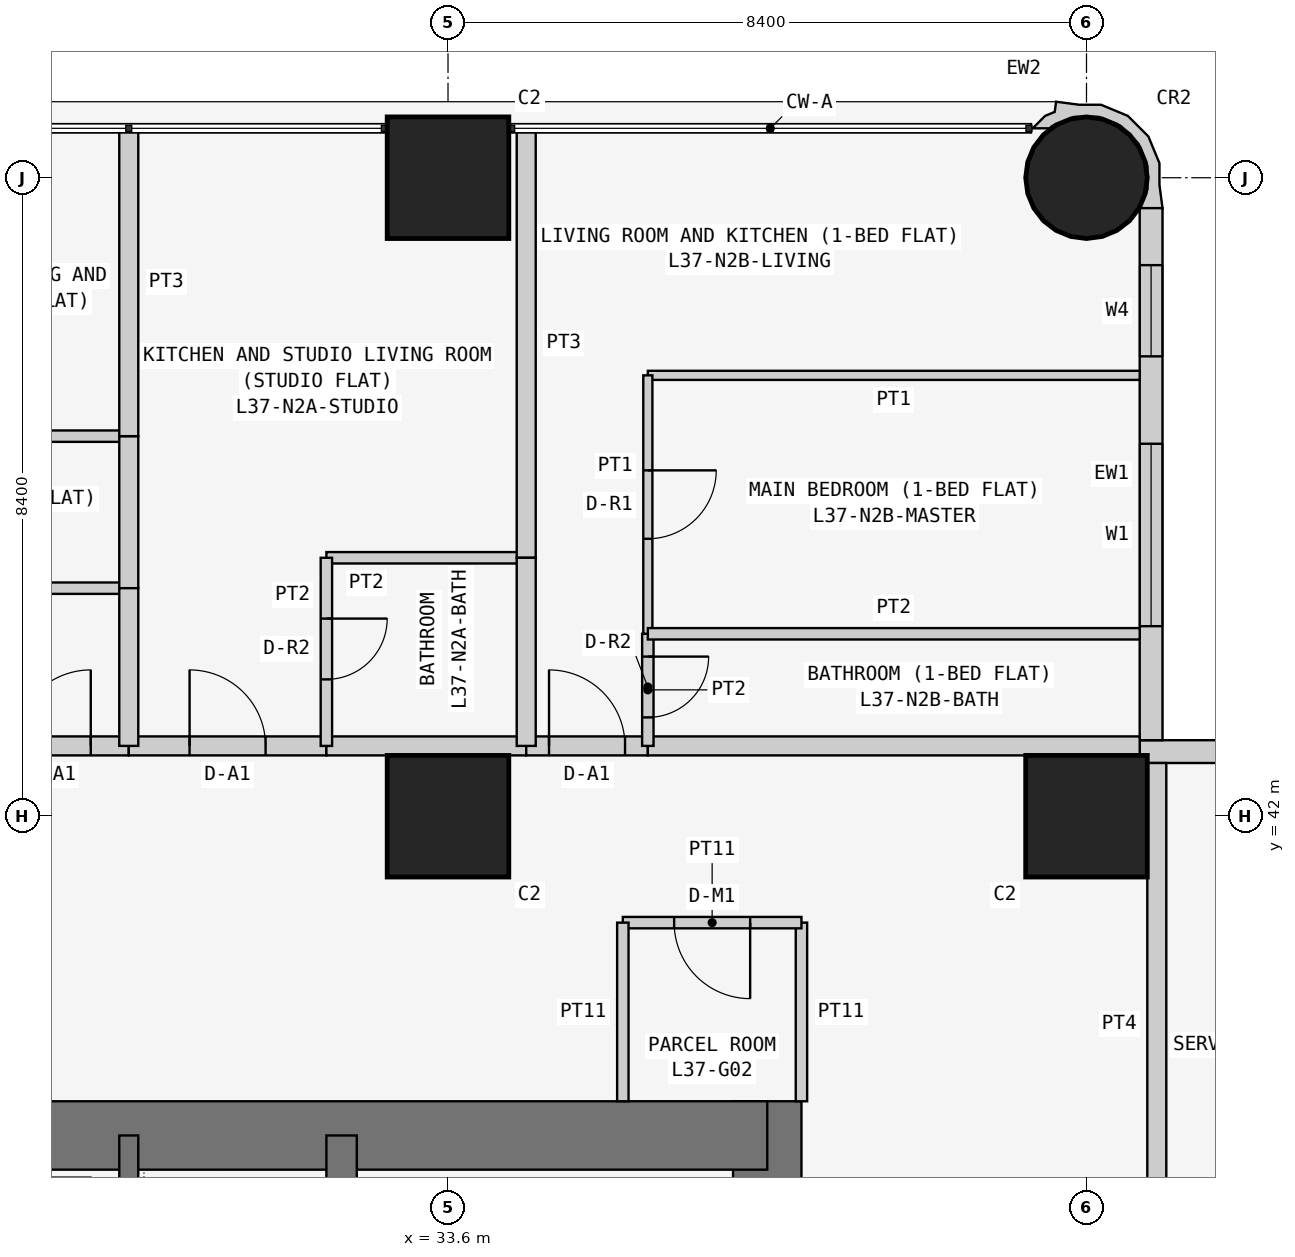
"""IFC4 building model, lengths in metres.
Left out: names, types, materials, properties, quantities, classifications, styles, units other than length and angle.
Written with IfcOpenShell. Run it as: python <this file> out.ifc"""

import sys

from ifc_helpers import new_model, si_unit, direction, frame, frame_2d, origin, origin_2d, place, context, subcontext, project, spatial, polyline, rectangle, circle, outline, extrude, element, fill, save


model = new_model("IFC4")
c1 = context("Model", 3, precision=1e-05, world=origin(), true_north=direction((0.0, 1.0)))
c2 = subcontext(c1, "Body", "Model", "MODEL_VIEW")
j1 = project(units=[si_unit("LENGTHUNIT", "METRE"), si_unit("PLANEANGLEUNIT", "RADIAN")], contexts=[c1])
p1 = place(None, origin())
s1 = spatial("IfcSite", under=j1, at=p1, CompositionType="ELEMENT")
p2 = place(p1, origin())
s2 = spatial("IfcBuilding", under=s1, at=p2, CompositionType="ELEMENT")
p3 = place(p2, frame((0.0, 0.0, 144.9)))
s3 = spatial("IfcBuildingStorey", under=s2, at=p3, CompositionType="ELEMENT", Elevation=144.9)
for number, where, z_axis, x_axis in (
    (1, (33.6, 42.0, 0.0), (0.0, 0.0, 1.0), (1.0, 0.0, 0.0)),
    (2, (33.6, 50.4, 0.0), (0.0, 0.0, 1.0), (1.0, 0.0, 0.0)),
    (3, (42.0, 42.0, 0.0), (0.0, 0.0, 1.0), (1.0, 0.0, 0.0)),
):
    element("IfcColumn", number, at=place(p3, frame(where, z_axis=z_axis, x_axis=x_axis)), inside=s3, PredefinedType="COLUMN", context=c2, shape_type="SweptSolid", body=[
        extrude(rectangle(XDim=1.6, YDim=1.6, at=origin_2d()), origin(), (0.0, 0.0, 1.0), 3.6),
    ])
p4 = place(p3, frame((42.0, 50.4, 0.0), z_axis=(0.0, 0.0, 1.0), x_axis=(1.0, 0.0, 0.0)))
e4 = element("IfcColumn", 4, at=p4, inside=s3, PredefinedType="COLUMN", context=c2, shape_type="SweptSolid", body=[
    extrude(circle(Radius=0.8, at=origin_2d()), origin(), (0.0, 0.0, 1.0), 3.6),
])
p5 = place(p3, frame((37.8, 21.0, 0.0), z_axis=(0.0, 0.0, 1.0), x_axis=(0.0, 1.0, 0.0)))
e5 = element("IfcWall", 5, at=p5, inside=s3, PredefinedType="SHEAR", context=c2, shape_type="SweptSolid", body=[
    extrude(rectangle(XDim=17.25, YDim=0.9, at=frame_2d((8.625, 0.0))), origin(), (0.0, 0.0, 1.0), 3.6),
])
p6 = place(p5, frame((5.2, 0.0, 0.0)))
e6 = element("IfcOpeningElement", 6, at=p6, cuts=e5, PredefinedType="OPENING", context=c2, shape_type="SweptSolid", body=[
    extrude(rectangle(XDim=1.2, YDim=2.1, at=frame_2d((0.6, 1.05))), frame((0.0, 0.46, 0.0), z_axis=(0.0, -1.0, 0.0), x_axis=(1.0, 0.0, 0.0)), (0.0, 0.0, 1.0), 0.92),
])
p7 = place(p3, frame((37.8, 37.8, 0.0), z_axis=(0.0, 0.0, 1.0), x_axis=(-1.0, 0.0, 0.0)))
e7 = element("IfcWall", 7, at=p7, inside=s3, PredefinedType="SHEAR", context=c2, shape_type="SweptSolid", body=[
    extrude(rectangle(XDim=17.25, YDim=0.9, at=frame_2d((8.625, 0.0))), origin(), (0.0, 0.0, 1.0), 3.6),
])
p8 = place(p3, frame((32.2, 29.2, 0.0), z_axis=(0.0, 0.0, 1.0), x_axis=(0.0, 1.0, 0.0)))
e8 = element("IfcWall", 8, at=p8, inside=s3, PredefinedType="SHEAR", context=c2, shape_type="SweptSolid", body=[
    extrude(rectangle(XDim=8.6, YDim=0.4, at=frame_2d((4.3, 0.0))), origin(), (0.0, 0.0, 1.0), 3.6),
])
p9 = place(p3, frame((29.4, 34.6, 0.0), z_axis=(0.0, 0.0, 1.0), x_axis=(0.0, 1.0, 0.0)))
e9 = element("IfcWall", 9, at=p9, inside=s3, PredefinedType="SHEAR", context=c2, shape_type="SweptSolid", body=[
    extrude(rectangle(XDim=3.2, YDim=0.25, at=frame_2d((1.6, 0.0))), origin(), (0.0, 0.0, 1.0), 3.6),
])
p10 = place(p3, frame((58.4, 42.85, 0.0), z_axis=(0.0, 0.0, 1.0), x_axis=(-1.0, 0.0, 0.0)))
e10 = element("IfcWall", 10, at=p10, inside=s3, PredefinedType="SOLIDWALL", context=c2, shape_type="SweptSolid", body=[
    extrude(rectangle(XDim=15.7, YDim=0.3, at=frame_2d((7.85, 0.0))), origin(), (0.0, 0.0, 1.0), 3.45),
])
p11 = place(p10, frame((12.4, 0.0, 0.9)))
e11 = element("IfcOpeningElement", 11, at=p11, cuts=e10, PredefinedType="OPENING", context=c2, shape_type="SweptSolid", body=[
    extrude(rectangle(XDim=1.8, YDim=1.5, at=frame_2d((0.9, 0.75))), frame((0.0, 0.16, 0.0), z_axis=(0.0, -1.0, 0.0), x_axis=(1.0, 0.0, 0.0)), (0.0, 0.0, 1.0), 0.32),
])
p12 = place(p10, frame((9.55, 0.0, 1.5)))
e12 = element("IfcOpeningElement", 12, at=p12, cuts=e10, PredefinedType="OPENING", context=c2, shape_type="SweptSolid", body=[
    extrude(rectangle(XDim=0.9, YDim=0.7, at=frame_2d((0.45, 0.35))), frame((0.0, 0.16, 0.0), z_axis=(0.0, -1.0, 0.0), x_axis=(1.0, 0.0, 0.0)), (0.0, 0.0, 1.0), 0.32),
])
p13 = place(p10, frame((5.1, 0.0, 0.9)))
e13 = element("IfcOpeningElement", 13, at=p13, cuts=e10, PredefinedType="OPENING", context=c2, shape_type="SweptSolid", body=[
    extrude(rectangle(XDim=1.8, YDim=1.5, at=frame_2d((0.9, 0.75))), frame((0.0, 0.16, 0.0), z_axis=(0.0, -1.0, 0.0), x_axis=(1.0, 0.0, 0.0)), (0.0, 0.0, 1.0), 0.32),
])
p14 = place(p10, frame((2.0, 0.0, 0.0)))
e14 = element("IfcOpeningElement", 14, at=p14, cuts=e10, PredefinedType="OPENING", context=c2, shape_type="SweptSolid", body=[
    extrude(rectangle(XDim=0.9, YDim=2.4, at=frame_2d((0.45, 1.2))), frame((0.0, 0.16, 0.0), z_axis=(0.0, -1.0, 0.0), x_axis=(1.0, 0.0, 0.0)), (0.0, 0.0, 1.0), 0.32),
])
p15 = place(p10, frame((0.7, 0.0, 0.9)))
e15 = element("IfcOpeningElement", 15, at=p15, cuts=e10, PredefinedType="OPENING", context=c2, shape_type="SweptSolid", body=[
    extrude(rectangle(XDim=1.2, YDim=1.5, at=frame_2d((0.6, 0.75))), frame((0.0, 0.16, 0.0), z_axis=(0.0, -1.0, 0.0), x_axis=(1.0, 0.0, 0.0)), (0.0, 0.0, 1.0), 0.32),
])
p16 = place(p3, frame((42.85, 43.0, 0.0), z_axis=(0.0, 0.0, 1.0), x_axis=(0.0, 1.0, 0.0)))
e16 = element("IfcWall", 16, at=p16, inside=s3, PredefinedType="SOLIDWALL", context=c2, shape_type="SweptSolid", body=[
    extrude(rectangle(XDim=7.0, YDim=0.3, at=frame_2d((3.5, 0.0))), origin(), (0.0, 0.0, 1.0), 3.45),
])
p17 = place(p16, frame((1.5, 0.0, 0.9)))
e17 = element("IfcOpeningElement", 17, at=p17, cuts=e16, PredefinedType="OPENING", context=c2, shape_type="SweptSolid", body=[
    extrude(rectangle(XDim=2.4, YDim=1.5, at=frame_2d((1.2, 0.75))), frame((0.0, 0.16, 0.0), z_axis=(0.0, -1.0, 0.0), x_axis=(1.0, 0.0, 0.0)), (0.0, 0.0, 1.0), 0.32),
])
p18 = place(p16, frame((5.05, 0.0, 0.9)))
e18 = element("IfcOpeningElement", 18, at=p18, cuts=e16, PredefinedType="OPENING", context=c2, shape_type="SweptSolid", body=[
    extrude(rectangle(XDim=1.2, YDim=1.5, at=frame_2d((0.6, 0.75))), frame((0.0, 0.16, 0.0), z_axis=(0.0, -1.0, 0.0), x_axis=(1.0, 0.0, 0.0)), (0.0, 0.0, 1.0), 0.32),
])
p19 = place(p3, frame((42.817, 50.073, 0.0), z_axis=(0.0, 0.0, 1.0), x_axis=(0.343276641956, 0.93923434088, 0.0)))
e19 = element("IfcWall", 19, at=p19, inside=s3, PredefinedType="SOLIDWALL", context=c2, shape_type="SweptSolid", body=[
    extrude(outline(polyline([(0.266, -0.055), (0.535, 0.044), (0.817, 0.302), (0.978, 0.648), (0.994, 1.03), (0.895, 1.3), (0.828, 1.598), (0.697, 1.569), (0.604, 1.67), (0.394, 1.767), (0.471, 1.556), (0.509, 1.539), (0.724, 1.304), (0.833, 1.005), (0.82, 0.687), (0.686, 0.397), (0.451, 0.182), (0.152, 0.073), (-0.116, 0.084), (-0.128, 0.078), (-0.146, 0.071), (-0.006, -0.197), (0.266, -0.055)])), origin(), (0.0, 0.0, 1.0), 3.45),
])
p20 = place(p3, frame((38.25, 38.25, 0.0), z_axis=(0.0, 0.0, 1.0), x_axis=(0.0, 1.0, 0.0)))
e20 = element("IfcWall", 20, at=p20, inside=s3, PredefinedType="PARTITIONING", context=c2, shape_type="SweptSolid", body=[
    extrude(rectangle(XDim=2.35, YDim=0.15, at=frame_2d((1.175, 0.0))), origin(), (0.0, 0.0, 1.0), 3.45),
])
p21 = place(p3, frame((38.25, 40.6, 0.0), z_axis=(0.0, 0.0, 1.0), x_axis=(-1.0, 0.0, 0.0)))
e21 = element("IfcWall", 21, at=p21, inside=s3, PredefinedType="PARTITIONING", context=c2, shape_type="SweptSolid", body=[
    extrude(rectangle(XDim=2.35, YDim=0.15, at=frame_2d((1.175, 0.0))), origin(), (0.0, 0.0, 1.0), 3.45),
])
p22 = place(p21, frame((0.675, 0.0, 0.0)))
e22 = element("IfcOpeningElement", 22, at=p22, cuts=e21, PredefinedType="OPENING", context=c2, shape_type="SweptSolid", body=[
    extrude(rectangle(XDim=1.0, YDim=2.1, at=frame_2d((0.5, 1.05))), frame((0.0, 0.085, 0.0), z_axis=(0.0, -1.0, 0.0), x_axis=(1.0, 0.0, 0.0)), (0.0, 0.0, 1.0), 0.17),
])
p23 = place(p3, frame((35.9, 40.6, 0.0), z_axis=(0.0, 0.0, 1.0), x_axis=(0.0, -1.0, 0.0)))
e23 = element("IfcWall", 23, at=p23, inside=s3, PredefinedType="PARTITIONING", context=c2, shape_type="SweptSolid", body=[
    extrude(rectangle(XDim=2.35, YDim=0.15, at=frame_2d((1.175, 0.0))), origin(), (0.0, 0.0, 1.0), 3.45),
])
p24 = place(p3, frame((22.971, 42.925, 0.0), z_axis=(0.0, 0.0, 1.0), x_axis=(1.0, 0.0, 0.0)))
e24 = element("IfcWall", 24, at=p24, inside=s3, PredefinedType="PARTITIONING", context=c2, shape_type="SweptSolid", body=[
    extrude(rectangle(XDim=6.429, YDim=0.25, at=frame_2d((3.214, 0.0))), origin(), (0.0, 0.0, 1.0), 3.45),
])
p25 = place(p24, frame((4.929, 0.0, 0.0)))
e25 = element("IfcOpeningElement", 25, at=p25, cuts=e24, PredefinedType="OPENING", context=c2, shape_type="SweptSolid", body=[
    extrude(rectangle(XDim=1.0, YDim=2.1, at=frame_2d((0.5, 1.05))), frame((0.0, 0.135, 0.0), z_axis=(0.0, -1.0, 0.0), x_axis=(1.0, 0.0, 0.0)), (0.0, 0.0, 1.0), 0.27),
])
p26 = place(p3, frame((29.4, 42.925, 0.0), z_axis=(0.0, 0.0, 1.0), x_axis=(1.0, 0.0, 0.0)))
e26 = element("IfcWall", 26, at=p26, inside=s3, PredefinedType="PARTITIONING", context=c2, shape_type="SweptSolid", body=[
    extrude(rectangle(XDim=2.6, YDim=0.25, at=frame_2d((1.3, 0.0))), origin(), (0.0, 0.0, 1.0), 3.45),
])
p27 = place(p26, frame((0.8, 0.0, 0.0)))
e27 = element("IfcOpeningElement", 27, at=p27, cuts=e26, PredefinedType="OPENING", context=c2, shape_type="SweptSolid", body=[
    extrude(rectangle(XDim=1.0, YDim=2.1, at=frame_2d((0.5, 1.05))), frame((0.0, 0.135, 0.0), z_axis=(0.0, -1.0, 0.0), x_axis=(1.0, 0.0, 0.0)), (0.0, 0.0, 1.0), 0.27),
])
p28 = place(p3, frame((32.0, 42.925, 0.0), z_axis=(0.0, 0.0, 1.0), x_axis=(1.0, 0.0, 0.0)))
e28 = element("IfcWall", 28, at=p28, inside=s3, PredefinedType="PARTITIONING", context=c2, shape_type="SweptSolid", body=[
    extrude(rectangle(XDim=2.629, YDim=0.25, at=frame_2d((1.314, 0.0))), origin(), (0.0, 0.0, 1.0), 3.45),
])
p29 = place(p3, frame((34.629, 42.925, 0.0), z_axis=(0.0, 0.0, 1.0), x_axis=(1.0, 0.0, 0.0)))
e29 = element("IfcWall", 29, at=p29, inside=s3, PredefinedType="PARTITIONING", context=c2, shape_type="SweptSolid", body=[
    extrude(rectangle(XDim=1.6, YDim=0.25, at=frame_2d((0.8, 0.0))), origin(), (0.0, 0.0, 1.0), 3.45),
])
p30 = place(p29, frame((0.3, 0.0, 0.0)))
e30 = element("IfcOpeningElement", 30, at=p30, cuts=e29, PredefinedType="OPENING", context=c2, shape_type="SweptSolid", body=[
    extrude(rectangle(XDim=1.0, YDim=2.1, at=frame_2d((0.5, 1.05))), frame((0.0, 0.135, 0.0), z_axis=(0.0, -1.0, 0.0), x_axis=(1.0, 0.0, 0.0)), (0.0, 0.0, 1.0), 0.27),
])
p31 = place(p3, frame((36.229, 42.925, 0.0), z_axis=(0.0, 0.0, 1.0), x_axis=(1.0, 0.0, 0.0)))
e31 = element("IfcWall", 31, at=p31, inside=s3, PredefinedType="PARTITIONING", context=c2, shape_type="SweptSolid", body=[
    extrude(rectangle(XDim=6.471, YDim=0.25, at=frame_2d((3.235, 0.0))), origin(), (0.0, 0.0, 1.0), 3.45),
])
p32 = place(p3, frame((42.925, 42.7, 0.0), z_axis=(0.0, 0.0, 1.0), x_axis=(0.0, -1.0, 0.0)))
e32 = element("IfcWall", 32, at=p32, inside=s3, PredefinedType="PARTITIONING", context=c2, shape_type="SweptSolid", body=[
    extrude(rectangle(XDim=6.871, YDim=0.25, at=frame_2d((3.436, 0.0))), origin(), (0.0, 0.0, 1.0), 3.45),
])
for number, where, z_axis, x_axis in (
    (33, (29.4, 47.0, 0.0), (0.0, 0.0, 1.0), (-1.0, 0.0, 0.0)),
    (34, (24.171, 45.0, 0.0), (0.0, 0.0, 1.0), (1.0, 0.0, 0.0)),
):
    element("IfcWall", number, at=place(p3, frame(where, z_axis=z_axis, x_axis=x_axis)), inside=s3, PredefinedType="PARTITIONING", context=c2, shape_type="SweptSolid", body=[
        extrude(rectangle(XDim=5.229, YDim=0.15, at=frame_2d((2.615, 0.0))), origin(), (0.0, 0.0, 1.0), 3.45),
    ])
p33 = place(p3, frame((29.4, 45.0, 0.0), z_axis=(0.0, 0.0, 1.0), x_axis=(0.0, 1.0, 0.0)))
e35 = element("IfcWall", 35, at=p33, inside=s3, PredefinedType="PARTITIONING", context=c2, shape_type="SweptSolid", body=[
    extrude(rectangle(XDim=2.0, YDim=0.25, at=frame_2d((1.0, 0.0))), origin(), (0.0, 0.0, 1.0), 2.848),
])
p34 = place(p3, frame((29.4, 45.0, 0.0), z_axis=(0.0, 0.0, 1.0), x_axis=(0.0, -1.0, 0.0)))
e36 = element("IfcWall", 36, at=p34, inside=s3, PredefinedType="PARTITIONING", context=c2, shape_type="SweptSolid", body=[
    extrude(rectangle(XDim=2.075, YDim=0.25, at=frame_2d((1.038, 0.0))), origin(), (0.0, 0.0, 1.0), 2.848),
])
p35 = place(p3, frame((29.4, 51.05, 0.0), z_axis=(0.0, 0.0, 1.0), x_axis=(0.0, -1.0, 0.0)))
e37 = element("IfcWall", 37, at=p35, inside=s3, PredefinedType="PARTITIONING", context=c2, shape_type="SweptSolid", body=[
    extrude(rectangle(XDim=4.05, YDim=0.25, at=frame_2d((2.025, 0.0))), origin(), (0.0, 0.0, 1.0), 2.848),
])
p36 = place(p3, frame((34.629, 45.4, 0.0), z_axis=(0.0, 0.0, 1.0), x_axis=(-1.0, 0.0, 0.0)))
e38 = element("IfcWall", 38, at=p36, inside=s3, PredefinedType="PARTITIONING", context=c2, shape_type="SweptSolid", body=[
    extrude(rectangle(XDim=2.629, YDim=0.15, at=frame_2d((1.314, 0.0))), origin(), (0.0, 0.0, 1.0), 3.45),
])
p37 = place(p3, frame((32.0, 45.4, 0.0), z_axis=(0.0, 0.0, 1.0), x_axis=(0.0, -1.0, 0.0)))
e39 = element("IfcWall", 39, at=p37, inside=s3, PredefinedType="PARTITIONING", context=c2, shape_type="SweptSolid", body=[
    extrude(rectangle(XDim=2.475, YDim=0.15, at=frame_2d((1.237, 0.0))), origin(), (0.0, 0.0, 1.0), 3.45),
])
p38 = place(p37, frame((0.8, 0.0, 0.0)))
e40 = element("IfcOpeningElement", 40, at=p38, cuts=e39, PredefinedType="OPENING", context=c2, shape_type="SweptSolid", body=[
    extrude(rectangle(XDim=0.8, YDim=2.1, at=frame_2d((0.4, 1.05))), frame((0.0, 0.085, 0.0), z_axis=(0.0, -1.0, 0.0), x_axis=(1.0, 0.0, 0.0)), (0.0, 0.0, 1.0), 0.17),
])
p39 = place(p3, frame((34.629, 51.05, 0.0), z_axis=(0.0, 0.0, 1.0), x_axis=(0.0, -1.0, 0.0)))
e41 = element("IfcWall", 41, at=p39, inside=s3, PredefinedType="PARTITIONING", context=c2, shape_type="SweptSolid", body=[
    extrude(rectangle(XDim=5.65, YDim=0.25, at=frame_2d((2.825, 0.0))), origin(), (0.0, 0.0, 1.0), 3.45),
])
p40 = place(p3, frame((34.629, 45.4, 0.0), z_axis=(0.0, 0.0, 1.0), x_axis=(0.0, -1.0, 0.0)))
e42 = element("IfcWall", 42, at=p40, inside=s3, PredefinedType="PARTITIONING", context=c2, shape_type="SweptSolid", body=[
    extrude(rectangle(XDim=2.475, YDim=0.25, at=frame_2d((1.237, 0.0))), origin(), (0.0, 0.0, 1.0), 3.45),
])
p41 = place(p3, frame((36.229, 44.4, 0.0), z_axis=(0.0, 0.0, 1.0), x_axis=(0.0, -1.0, 0.0)))
e43 = element("IfcWall", 43, at=p41, inside=s3, PredefinedType="PARTITIONING", context=c2, shape_type="SweptSolid", body=[
    extrude(rectangle(XDim=1.475, YDim=0.15, at=frame_2d((0.737, 0.0))), origin(), (0.0, 0.0, 1.0), 3.45),
])
p42 = place(p41, frame((0.3, 0.0, 0.0)))
e44 = element("IfcOpeningElement", 44, at=p42, cuts=e43, PredefinedType="OPENING", context=c2, shape_type="SweptSolid", body=[
    extrude(rectangle(XDim=0.8, YDim=2.1, at=frame_2d((0.4, 1.05))), frame((0.0, 0.085, 0.0), z_axis=(0.0, -1.0, 0.0), x_axis=(1.0, 0.0, 0.0)), (0.0, 0.0, 1.0), 0.17),
])
p43 = place(p3, frame((42.7, 47.8, 0.0), z_axis=(0.0, 0.0, 1.0), x_axis=(-1.0, 0.0, 0.0)))
e45 = element("IfcWall", 45, at=p43, inside=s3, PredefinedType="PARTITIONING", context=c2, shape_type="SweptSolid", body=[
    extrude(rectangle(XDim=6.471, YDim=0.12, at=frame_2d((3.235, 0.0))), origin(), (0.0, 0.0, 1.0), 3.45),
])
p44 = place(p3, frame((36.229, 47.8, 0.0), z_axis=(0.0, 0.0, 1.0), x_axis=(0.0, -1.0, 0.0)))
e46 = element("IfcWall", 46, at=p44, inside=s3, PredefinedType="PARTITIONING", context=c2, shape_type="SweptSolid", body=[
    extrude(rectangle(XDim=3.4, YDim=0.12, at=frame_2d((1.7, 0.0))), origin(), (0.0, 0.0, 1.0), 3.45),
])
p45 = place(p44, frame((1.25, 0.0, 0.0)))
e47 = element("IfcOpeningElement", 47, at=p45, cuts=e46, PredefinedType="OPENING", context=c2, shape_type="SweptSolid", body=[
    extrude(rectangle(XDim=0.9, YDim=2.1, at=frame_2d((0.45, 1.05))), frame((0.0, 0.07, 0.0), z_axis=(0.0, -1.0, 0.0), x_axis=(1.0, 0.0, 0.0)), (0.0, 0.0, 1.0), 0.14),
])
p46 = place(p3, frame((36.229, 44.4, 0.0), z_axis=(0.0, 0.0, 1.0), x_axis=(1.0, 0.0, 0.0)))
e48 = element("IfcWall", 48, at=p46, inside=s3, PredefinedType="PARTITIONING", context=c2, shape_type="SweptSolid", body=[
    extrude(rectangle(XDim=6.471, YDim=0.15, at=frame_2d((3.235, 0.0))), origin(), (0.0, 0.0, 1.0), 3.45),
])
p47 = place(p17, origin())
e49 = element("IfcWindow", 49, at=p47, inside=s3, PartitioningType="SINGLE_PANEL", PredefinedType="WINDOW", context=c2, shape_type="SweptSolid", body=[
    extrude(rectangle(XDim=2.4, YDim=1.5, at=frame_2d((1.2, 0.75))), frame((0.0, 0.03, 0.0), z_axis=(0.0, -1.0, 0.0), x_axis=(1.0, 0.0, 0.0)), (0.0, 0.0, 1.0), 0.06),
])
fill(e17, e49)
p48 = place(p18, origin())
e50 = element("IfcWindow", 50, at=p48, inside=s3, PartitioningType="SINGLE_PANEL", PredefinedType="WINDOW", context=c2, shape_type="SweptSolid", body=[
    extrude(rectangle(XDim=1.2, YDim=1.5, at=frame_2d((0.6, 0.75))), frame((0.0, 0.03, 0.0), z_axis=(0.0, -1.0, 0.0), x_axis=(1.0, 0.0, 0.0)), (0.0, 0.0, 1.0), 0.06),
])
fill(e18, e50)
p49 = place(p22, origin())
e51 = element("IfcDoor", 51, at=p49, inside=s3, OperationType="SINGLE_SWING_LEFT", PredefinedType="DOOR", context=c2, shape_type="SweptSolid", body=[
    extrude(rectangle(XDim=1.0, YDim=2.1, at=frame_2d((0.5, 1.05))), frame((0.0, 0.025, 0.0), z_axis=(0.0, -1.0, 0.0), x_axis=(1.0, 0.0, 0.0)), (0.0, 0.0, 1.0), 0.05),
])
fill(e22, e51)
p50 = place(p25, origin())
e52 = element("IfcDoor", 52, at=p50, inside=s3, OperationType="SINGLE_SWING_RIGHT", PredefinedType="DOOR", context=c2, shape_type="SweptSolid", body=[
    extrude(rectangle(XDim=1.0, YDim=2.1, at=frame_2d((0.5, 1.05))), frame((0.0, 0.025, 0.0), z_axis=(0.0, -1.0, 0.0), x_axis=(1.0, 0.0, 0.0)), (0.0, 0.0, 1.0), 0.05),
])
fill(e25, e52)
p51 = place(p27, origin())
e53 = element("IfcDoor", 53, at=p51, inside=s3, OperationType="SINGLE_SWING_LEFT", PredefinedType="DOOR", context=c2, shape_type="SweptSolid", body=[
    extrude(rectangle(XDim=1.0, YDim=2.1, at=frame_2d((0.5, 1.05))), frame((0.0, 0.025, 0.0), z_axis=(0.0, -1.0, 0.0), x_axis=(1.0, 0.0, 0.0)), (0.0, 0.0, 1.0), 0.05),
])
fill(e27, e53)
p52 = place(p38, origin())
e54 = element("IfcDoor", 54, at=p52, inside=s3, OperationType="SINGLE_SWING_LEFT", PredefinedType="DOOR", context=c2, shape_type="SweptSolid", body=[
    extrude(rectangle(XDim=0.8, YDim=2.1, at=frame_2d((0.4, 1.05))), frame((0.0, 0.025, 0.0), z_axis=(0.0, -1.0, 0.0), x_axis=(1.0, 0.0, 0.0)), (0.0, 0.0, 1.0), 0.05),
])
fill(e40, e54)
p53 = place(p30, origin())
e55 = element("IfcDoor", 55, at=p53, inside=s3, OperationType="SINGLE_SWING_LEFT", PredefinedType="DOOR", context=c2, shape_type="SweptSolid", body=[
    extrude(rectangle(XDim=1.0, YDim=2.1, at=frame_2d((0.5, 1.05))), frame((0.0, 0.025, 0.0), z_axis=(0.0, -1.0, 0.0), x_axis=(1.0, 0.0, 0.0)), (0.0, 0.0, 1.0), 0.05),
])
fill(e30, e55)
p54 = place(p42, origin())
e56 = element("IfcDoor", 56, at=p54, inside=s3, OperationType="SINGLE_SWING_LEFT", PredefinedType="DOOR", context=c2, shape_type="SweptSolid", body=[
    extrude(rectangle(XDim=0.8, YDim=2.1, at=frame_2d((0.4, 1.05))), frame((0.0, 0.025, 0.0), z_axis=(0.0, -1.0, 0.0), x_axis=(1.0, 0.0, 0.0)), (0.0, 0.0, 1.0), 0.05),
])
fill(e44, e56)
p55 = place(p45, origin())
e57 = element("IfcDoor", 57, at=p55, inside=s3, OperationType="SINGLE_SWING_LEFT", PredefinedType="DOOR", context=c2, shape_type="SweptSolid", body=[
    extrude(rectangle(XDim=0.9, YDim=2.1, at=frame_2d((0.45, 1.05))), frame((0.0, 0.025, 0.0), z_axis=(0.0, -1.0, 0.0), x_axis=(1.0, 0.0, 0.0)), (0.0, 0.0, 1.0), 0.05),
])
fill(e47, e57)
save(model, sys.argv[1])
